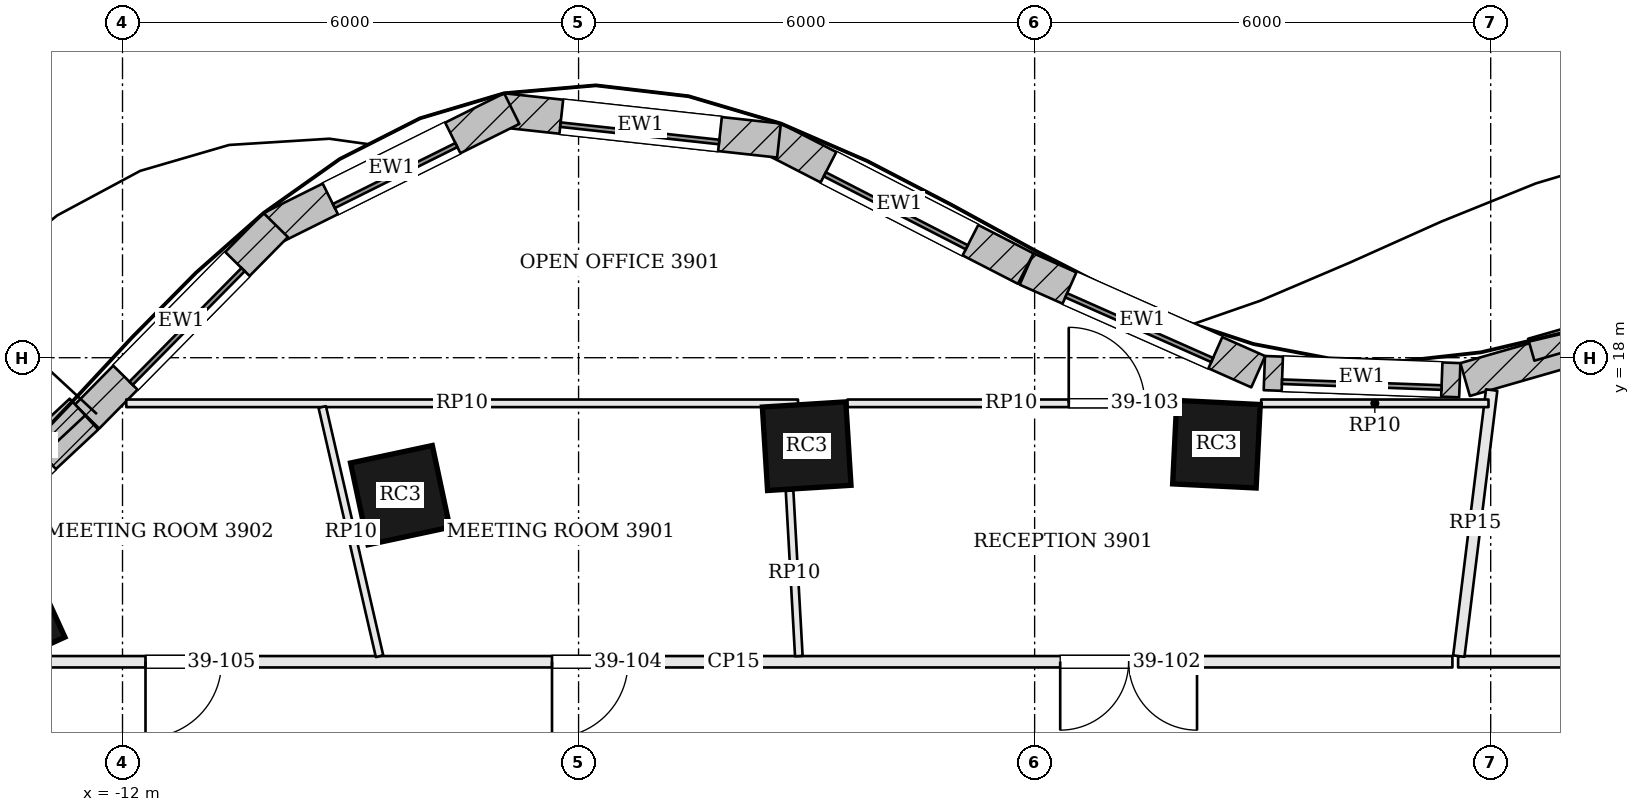
"""IFC4 building model, lengths in metres.
Left out: names, types, materials, properties, quantities, classifications, styles, units other than length and angle.
Written with IfcOpenShell. Run it as: python <this file> out.ifc"""

import sys

from ifc_helpers import new_model, si_unit, direction, frame, frame_2d, origin, origin_2d, place, context, subcontext, project, spatial, rectangle, extrude, element, fill, save


model = new_model("IFC4")
c1 = context("Model", 3, precision=1e-05, world=origin(), true_north=direction((0.0, 1.0)))
c2 = subcontext(c1, "Body", "Model", "MODEL_VIEW")
j1 = project(units=[si_unit("LENGTHUNIT", "METRE"), si_unit("PLANEANGLEUNIT", "RADIAN")], contexts=[c1])
p1 = place(None, origin())
s1 = spatial("IfcSite", under=j1, at=p1, CompositionType="ELEMENT")
p2 = place(p1, origin())
s2 = spatial("IfcBuilding", under=s1, at=p2, CompositionType="ELEMENT")
p3 = place(p2, frame((0.0, 0.0, 161.7)))
s3 = spatial("IfcBuildingStorey", under=s2, at=p3, CompositionType="ELEMENT", Elevation=161.7)
for number, where, z_axis, x_axis in (
    (1, (2.392, 16.862, 0.0), (0.0, 0.0, 1.0), (-0.999, 0.049, 0.0)),
    (2, (-2.999, 16.836, 0.0), (0.0, 0.0, 1.0), (-0.998, -0.062, 0.0)),
    (3, (-8.347, 16.192, 0.0), (0.0, 0.0, 1.0), (-0.978, -0.209, 0.0)),
    (4, (-13.487, 14.596, 0.0), (0.0, 0.0, 1.0), (-0.91, -0.415, 0.0)),
):
    element("IfcColumn", number, at=place(p3, frame(where, z_axis=z_axis, x_axis=x_axis)), inside=s3, PredefinedType="COLUMN", context=c2, shape_type="SweptSolid", body=[
        extrude(rectangle(XDim=1.1, YDim=1.1, at=origin_2d()), origin(), (0.0, 0.0, 1.0), 3.9),
    ])
p4 = place(p3, frame((10.167, 19.007, 0.0), z_axis=(0.0, 0.0, 1.0), x_axis=(-0.961104057783, -0.276186513271, 0.0)))
e5 = element("IfcWall", 5, at=p4, inside=s3, PredefinedType="SOLIDWALL", context=c2, shape_type="SweptSolid", body=[
    extrude(rectangle(XDim=4.686, YDim=0.45, at=frame_2d((2.343, 0.0))), origin(), (0.0, 0.0, 1.0), 3.7),
])
p5 = place(p4, frame((1.443, 0.0, 0.9)))
e6 = element("IfcOpeningElement", 6, at=p5, cuts=e5, PredefinedType="OPENING", context=c2, shape_type="SweptSolid", body=[
    extrude(rectangle(XDim=1.8, YDim=2.3, at=frame_2d((0.9, 1.15))), frame((0.0, 0.235, 0.0), z_axis=(0.0, -1.0, 0.0), x_axis=(1.0, 0.0, 0.0)), (0.0, 0.0, 1.0), 0.47),
])
p6 = place(p3, frame((5.594, 17.704, 0.0), z_axis=(0.0, 0.0, 1.0), x_axis=(-0.999339560591, 0.036337895349, 0.0)))
e7 = element("IfcWall", 7, at=p6, inside=s3, PredefinedType="SOLIDWALL", context=c2, shape_type="SweptSolid", body=[
    extrude(rectangle(XDim=2.573, YDim=0.45, at=frame_2d((1.287, 0.0))), origin(), (0.0, 0.0, 1.0), 3.7),
])
p7 = place(p6, frame((0.237, 0.0, 0.9)))
e8 = element("IfcOpeningElement", 8, at=p7, cuts=e7, PredefinedType="OPENING", context=c2, shape_type="SweptSolid", body=[
    extrude(rectangle(XDim=2.1, YDim=2.3, at=frame_2d((1.05, 1.15))), frame((0.0, 0.235, 0.0), z_axis=(0.0, -1.0, 0.0), x_axis=(1.0, 0.0, 0.0)), (0.0, 0.0, 1.0), 0.47),
])
p8 = place(p3, frame((2.942, 17.816, 0.0), z_axis=(0.0, 0.0, 1.0), x_axis=(-0.91414046241, 0.405397601109, 0.0)))
e9 = element("IfcWall", 9, at=p8, inside=s3, PredefinedType="SOLIDWALL", context=c2, shape_type="SweptSolid", body=[
    extrude(rectangle(XDim=3.333, YDim=0.45, at=frame_2d((1.667, 0.0))), origin(), (0.0, 0.0, 1.0), 3.7),
])
p9 = place(p8, frame((0.617, 0.0, 0.9)))
e10 = element("IfcOpeningElement", 10, at=p9, cuts=e9, PredefinedType="OPENING", context=c2, shape_type="SweptSolid", body=[
    extrude(rectangle(XDim=2.1, YDim=2.3, at=frame_2d((1.05, 1.15))), frame((0.0, 0.235, 0.0), z_axis=(0.0, -1.0, 0.0), x_axis=(1.0, 0.0, 0.0)), (0.0, 0.0, 1.0), 0.47),
])
p10 = place(p3, frame((-0.117, 19.173, 0.0), z_axis=(0.0, 0.0, 1.0), x_axis=(-0.889471529144, 0.456990589446, 0.0)))
e11 = element("IfcWall", 11, at=p10, inside=s3, PredefinedType="SOLIDWALL", context=c2, shape_type="SweptSolid", body=[
    extrude(rectangle(XDim=3.735, YDim=0.45, at=frame_2d((1.868, 0.0))), origin(), (0.0, 0.0, 1.0), 3.7),
])
p11 = place(p10, frame((0.818, 0.0, 0.9)))
e12 = element("IfcOpeningElement", 12, at=p11, cuts=e11, PredefinedType="OPENING", context=c2, shape_type="SweptSolid", body=[
    extrude(rectangle(XDim=2.1, YDim=2.3, at=frame_2d((1.05, 1.15))), frame((0.0, 0.235, 0.0), z_axis=(0.0, -1.0, 0.0), x_axis=(1.0, 0.0, 0.0)), (0.0, 0.0, 1.0), 0.47),
])
p12 = place(p3, frame((-3.364, 20.857, 0.0), z_axis=(0.0, 0.0, 1.0), x_axis=(-0.99407653264, 0.108682322638, 0.0)))
e13 = element("IfcWall", 13, at=p12, inside=s3, PredefinedType="SOLIDWALL", context=c2, shape_type="SweptSolid", body=[
    extrude(rectangle(XDim=3.662, YDim=0.45, at=frame_2d((1.831, 0.0))), origin(), (0.0, 0.0, 1.0), 3.7),
])
p13 = place(p12, frame((0.781, 0.0, 0.9)))
e14 = element("IfcOpeningElement", 14, at=p13, cuts=e13, PredefinedType="OPENING", context=c2, shape_type="SweptSolid", body=[
    extrude(rectangle(XDim=2.1, YDim=2.3, at=frame_2d((1.05, 1.15))), frame((0.0, 0.235, 0.0), z_axis=(0.0, -1.0, 0.0), x_axis=(1.0, 0.0, 0.0)), (0.0, 0.0, 1.0), 0.47),
])
p14 = place(p3, frame((-6.879, 21.278, 0.0), z_axis=(0.0, 0.0, 1.0), x_axis=(-0.895268695224, -0.445526613517, 0.0)))
e15 = element("IfcWall", 15, at=p14, inside=s3, PredefinedType="SOLIDWALL", context=c2, shape_type="SweptSolid", body=[
    extrude(rectangle(XDim=3.533, YDim=0.45, at=frame_2d((1.767, 0.0))), origin(), (0.0, 0.0, 1.0), 3.7),
])
p15 = place(p14, frame((0.866, 0.0, 0.9)))
e16 = element("IfcOpeningElement", 16, at=p15, cuts=e15, PredefinedType="OPENING", context=c2, shape_type="SweptSolid", body=[
    extrude(rectangle(XDim=1.8, YDim=2.3, at=frame_2d((0.9, 1.15))), frame((0.0, 0.235, 0.0), z_axis=(0.0, -1.0, 0.0), x_axis=(1.0, 0.0, 0.0)), (0.0, 0.0, 1.0), 0.47),
])
p16 = place(p3, frame((-9.984, 19.745, 0.0), z_axis=(0.0, 0.0, 1.0), x_axis=(-0.701875966769, -0.712299183821, 0.0)))
e17 = element("IfcWall", 17, at=p16, inside=s3, PredefinedType="SOLIDWALL", context=c2, shape_type="SweptSolid", body=[
    extrude(rectangle(XDim=3.537, YDim=0.45, at=frame_2d((1.769, 0.0))), origin(), (0.0, 0.0, 1.0), 3.7),
])
p17 = place(p16, frame((0.718, 0.0, 0.9)))
e18 = element("IfcOpeningElement", 18, at=p17, cuts=e17, PredefinedType="OPENING", context=c2, shape_type="SweptSolid", body=[
    extrude(rectangle(XDim=2.1, YDim=2.3, at=frame_2d((1.05, 1.15))), frame((0.0, 0.235, 0.0), z_axis=(0.0, -1.0, 0.0), x_axis=(1.0, 0.0, 0.0)), (0.0, 0.0, 1.0), 0.47),
])
p18 = place(p3, frame((-12.473, 17.219, 0.0), z_axis=(0.0, 0.0, 1.0), x_axis=(-0.730618259172, -0.68278617397, 0.0)))
e19 = element("IfcWall", 19, at=p18, inside=s3, PredefinedType="SOLIDWALL", context=c2, shape_type="SweptSolid", body=[
    extrude(rectangle(XDim=3.624, YDim=0.45, at=frame_2d((1.812, 0.0))), origin(), (0.0, 0.0, 1.0), 3.7),
])
p19 = place(p18, frame((0.762, 0.0, 0.9)))
e20 = element("IfcOpeningElement", 20, at=p19, cuts=e19, PredefinedType="OPENING", context=c2, shape_type="SweptSolid", body=[
    extrude(rectangle(XDim=2.1, YDim=2.3, at=frame_2d((1.05, 1.15))), frame((0.0, 0.235, 0.0), z_axis=(0.0, -1.0, 0.0), x_axis=(1.0, 0.0, 0.0)), (0.0, 0.0, 1.0), 0.47),
])
p20 = place(p3, frame((9.765, 19.034, 3.9), z_axis=(0.0, 0.0, 1.0), x_axis=(-0.961095330658, -0.276216881069, 0.0)))
e21 = element("IfcWall", 21, at=p20, inside=s3, PredefinedType="PARAPET", context=c2, shape_type="SweptSolid", body=[
    extrude(rectangle(XDim=3.362, YDim=0.3, at=frame_2d((1.681, 0.0))), origin(), (0.0, 0.0, 1.0), 1.1),
])
p21 = place(p3, frame((-12.593, 17.351, 3.9), z_axis=(0.0, 0.0, 1.0), x_axis=(-0.730582493513, -0.682824443157, 0.0)))
e22 = element("IfcWall", 22, at=p21, inside=s3, PredefinedType="PARAPET", context=c2, shape_type="SweptSolid", body=[
    extrude(rectangle(XDim=1.477, YDim=0.3, at=frame_2d((0.739, 0.0))), origin(), (0.0, 0.0, 1.0), 1.1),
])
p22 = place(p3, frame((14.925, 14.0, 0.0), z_axis=(0.0, 0.0, 1.0), x_axis=(-1.0, 0.0, 0.0)))
e23 = element("IfcWall", 23, at=p22, inside=s3, PredefinedType="PARTITIONING", context=c2, shape_type="SweptSolid", body=[
    extrude(rectangle(XDim=9.354, YDim=0.15, at=frame_2d((4.677, 0.0))), origin(), (0.0, 0.0, 1.0), 3.198),
])
p23 = place(p3, frame((6.013, 17.575, 0.0), z_axis=(0.0, 0.0, 1.0), x_axis=(-0.122526572003, -0.992465233221, 0.0)))
e24 = element("IfcWall", 24, at=p23, inside=s3, PredefinedType="PARTITIONING", context=c2, shape_type="SweptSolid", body=[
    extrude(rectangle(XDim=3.527, YDim=0.15, at=frame_2d((1.763, 0.0))), origin(), (0.0, 0.0, 1.0), 3.234),
])
p24 = place(p3, frame((5.497, 14.0, 0.0), z_axis=(0.0, 0.0, 1.0), x_axis=(-1.0, 0.0, 0.0)))
e25 = element("IfcWall", 25, at=p24, inside=s3, PredefinedType="PARTITIONING", context=c2, shape_type="SweptSolid", body=[
    extrude(rectangle(XDim=18.917, YDim=0.15, at=frame_2d((9.458, 0.0))), origin(), (0.0, 0.0, 1.0), 3.198),
])
p25 = place(p24, frame((3.36, 0.0, 0.0)))
e26 = element("IfcOpeningElement", 26, at=p25, cuts=e25, PredefinedType="OPENING", context=c2, shape_type="SweptSolid", body=[
    extrude(rectangle(XDim=1.8, YDim=2.1, at=frame_2d((0.9, 1.05))), frame((0.0, 0.085, 0.0), z_axis=(0.0, -1.0, 0.0), x_axis=(1.0, 0.0, 0.0)), (0.0, 0.0, 1.0), 0.17),
])
p26 = place(p24, frame((10.846, 0.0, 0.0)))
e27 = element("IfcOpeningElement", 27, at=p26, cuts=e25, PredefinedType="OPENING", context=c2, shape_type="SweptSolid", body=[
    extrude(rectangle(XDim=1.0, YDim=2.4, at=frame_2d((0.5, 1.2))), frame((0.0, 0.085, 0.0), z_axis=(0.0, -1.0, 0.0), x_axis=(1.0, 0.0, 0.0)), (0.0, 0.0, 1.0), 0.17),
])
p27 = place(p24, frame((16.194, 0.0, 0.0)))
e28 = element("IfcOpeningElement", 28, at=p27, cuts=e25, PredefinedType="OPENING", context=c2, shape_type="SweptSolid", body=[
    extrude(rectangle(XDim=1.0, YDim=2.4, at=frame_2d((0.5, 1.2))), frame((0.0, 0.085, 0.0), z_axis=(0.0, -1.0, 0.0), x_axis=(1.0, 0.0, 0.0)), (0.0, 0.0, 1.0), 0.17),
])
p28 = place(p3, frame((-11.951, 17.4, 0.0), z_axis=(0.0, 0.0, 1.0), x_axis=(1.0, 0.0, 0.0)))
e29 = element("IfcWall", 29, at=p28, inside=s3, PredefinedType="PARTITIONING", context=c2, shape_type="SweptSolid", body=[
    extrude(rectangle(XDim=8.838, YDim=0.1, at=frame_2d((4.419, 0.0))), origin(), (0.0, 0.0, 1.0), 3.198),
])
p29 = place(p3, frame((-2.463, 17.4, 0.0), z_axis=(0.0, 0.0, 1.0), x_axis=(1.0, 0.0, 0.0)))
e30 = element("IfcWall", 30, at=p29, inside=s3, PredefinedType="PARTITIONING", context=c2, shape_type="SweptSolid", body=[
    extrude(rectangle(XDim=4.311, YDim=0.1, at=frame_2d((2.156, 0.0))), origin(), (0.0, 0.0, 1.0), 3.198),
])
p30 = place(p29, frame((2.912, 0.0, 0.0)))
e31 = element("IfcOpeningElement", 31, at=p30, cuts=e30, PredefinedType="OPENING", context=c2, shape_type="SweptSolid", body=[
    extrude(rectangle(XDim=1.0, YDim=2.1, at=frame_2d((0.5, 1.05))), frame((0.0, 0.06, 0.0), z_axis=(0.0, -1.0, 0.0), x_axis=(1.0, 0.0, 0.0)), (0.0, 0.0, 1.0), 0.12),
])
p31 = place(p3, frame((2.981, 17.4, 0.0), z_axis=(0.0, 0.0, 1.0), x_axis=(1.0, 0.0, 0.0)))
e32 = element("IfcWall", 32, at=p31, inside=s3, PredefinedType="PARTITIONING", context=c2, shape_type="SweptSolid", body=[
    extrude(rectangle(XDim=2.99, YDim=0.1, at=frame_2d((1.495, 0.0))), origin(), (0.0, 0.0, 1.0), 3.198),
])
p32 = place(p3, frame((-3.102, 14.075, 0.0), z_axis=(0.0, 0.0, 1.0), x_axis=(-0.055904356841, 0.998436128596, 0.0)))
e33 = element("IfcWall", 33, at=p32, inside=s3, PredefinedType="PARTITIONING", context=c2, shape_type="SweptSolid", body=[
    extrude(rectangle(XDim=2.179, YDim=0.1, at=frame_2d((1.09, 0.0))), origin(), (0.0, 0.0, 1.0), 3.198),
])
p33 = place(p3, frame((-8.618, 14.073, 0.0), z_axis=(0.0, 0.0, 1.0), x_axis=(-0.224048430302, 0.974578011695, 0.0)))
e34 = element("IfcWall", 34, at=p33, inside=s3, PredefinedType="PARTITIONING", context=c2, shape_type="SweptSolid", body=[
    extrude(rectangle(XDim=3.364, YDim=0.1, at=frame_2d((1.682, 0.0))), origin(), (0.0, 0.0, 1.0), 3.198),
])
p34 = place(p7, origin())
e35 = element("IfcWindow", 35, at=p34, inside=s3, PartitioningType="SINGLE_PANEL", PredefinedType="WINDOW", context=c2, shape_type="SweptSolid", body=[
    extrude(rectangle(XDim=2.1, YDim=2.3, at=frame_2d((1.05, 1.15))), frame((0.0, 0.135, 0.0), z_axis=(0.0, -1.0, 0.0), x_axis=(1.0, 0.0, 0.0)), (0.0, 0.0, 1.0), 0.06),
])
fill(e8, e35)
p35 = place(p9, origin())
e36 = element("IfcWindow", 36, at=p35, inside=s3, PartitioningType="SINGLE_PANEL", PredefinedType="WINDOW", context=c2, shape_type="SweptSolid", body=[
    extrude(rectangle(XDim=2.1, YDim=2.3, at=frame_2d((1.05, 1.15))), frame((0.0, 0.135, 0.0), z_axis=(0.0, -1.0, 0.0), x_axis=(1.0, 0.0, 0.0)), (0.0, 0.0, 1.0), 0.06),
])
fill(e10, e36)
p36 = place(p11, origin())
e37 = element("IfcWindow", 37, at=p36, inside=s3, PartitioningType="SINGLE_PANEL", PredefinedType="WINDOW", context=c2, shape_type="SweptSolid", body=[
    extrude(rectangle(XDim=2.1, YDim=2.3, at=frame_2d((1.05, 1.15))), frame((0.0, 0.135, 0.0), z_axis=(0.0, -1.0, 0.0), x_axis=(1.0, 0.0, 0.0)), (0.0, 0.0, 1.0), 0.06),
])
fill(e12, e37)
p37 = place(p13, origin())
e38 = element("IfcWindow", 38, at=p37, inside=s3, PartitioningType="SINGLE_PANEL", PredefinedType="WINDOW", context=c2, shape_type="SweptSolid", body=[
    extrude(rectangle(XDim=2.1, YDim=2.3, at=frame_2d((1.05, 1.15))), frame((0.0, 0.135, 0.0), z_axis=(0.0, -1.0, 0.0), x_axis=(1.0, 0.0, 0.0)), (0.0, 0.0, 1.0), 0.06),
])
fill(e14, e38)
p38 = place(p15, origin())
e39 = element("IfcWindow", 39, at=p38, inside=s3, PartitioningType="SINGLE_PANEL", PredefinedType="WINDOW", context=c2, shape_type="SweptSolid", body=[
    extrude(rectangle(XDim=1.8, YDim=2.3, at=frame_2d((0.9, 1.15))), frame((0.0, 0.135, 0.0), z_axis=(0.0, -1.0, 0.0), x_axis=(1.0, 0.0, 0.0)), (0.0, 0.0, 1.0), 0.06),
])
fill(e16, e39)
p39 = place(p17, origin())
e40 = element("IfcWindow", 40, at=p39, inside=s3, PartitioningType="SINGLE_PANEL", PredefinedType="WINDOW", context=c2, shape_type="SweptSolid", body=[
    extrude(rectangle(XDim=2.1, YDim=2.3, at=frame_2d((1.05, 1.15))), frame((0.0, 0.135, 0.0), z_axis=(0.0, -1.0, 0.0), x_axis=(1.0, 0.0, 0.0)), (0.0, 0.0, 1.0), 0.06),
])
fill(e18, e40)
p40 = place(p25, origin())
e41 = element("IfcDoor", 41, at=p40, inside=s3, OperationType="DOUBLE_DOOR_SINGLE_SWING", PredefinedType="DOOR", context=c2, shape_type="SweptSolid", body=[
    extrude(rectangle(XDim=1.8, YDim=2.1, at=frame_2d((0.9, 1.05))), frame((0.0, 0.025, 0.0), z_axis=(0.0, -1.0, 0.0), x_axis=(1.0, 0.0, 0.0)), (0.0, 0.0, 1.0), 0.05),
])
fill(e26, e41)
p41 = place(p30, origin())
e42 = element("IfcDoor", 42, at=p41, inside=s3, OperationType="SINGLE_SWING_LEFT", PredefinedType="DOOR", context=c2, shape_type="SweptSolid", body=[
    extrude(rectangle(XDim=1.0, YDim=2.1, at=frame_2d((0.5, 1.05))), frame((0.0, 0.025, 0.0), z_axis=(0.0, -1.0, 0.0), x_axis=(1.0, 0.0, 0.0)), (0.0, 0.0, 1.0), 0.05),
])
fill(e31, e42)
p42 = place(p26, origin())
e43 = element("IfcDoor", 43, at=p42, inside=s3, OperationType="SINGLE_SWING_RIGHT", PredefinedType="DOOR", context=c2, shape_type="SweptSolid", body=[
    extrude(rectangle(XDim=1.0, YDim=2.4, at=frame_2d((0.5, 1.2))), frame((0.0, 0.025, 0.0), z_axis=(0.0, -1.0, 0.0), x_axis=(1.0, 0.0, 0.0)), (0.0, 0.0, 1.0), 0.05),
])
fill(e27, e43)
p43 = place(p27, origin())
e44 = element("IfcDoor", 44, at=p43, inside=s3, OperationType="SINGLE_SWING_RIGHT", PredefinedType="DOOR", context=c2, shape_type="SweptSolid", body=[
    extrude(rectangle(XDim=1.0, YDim=2.4, at=frame_2d((0.5, 1.2))), frame((0.0, 0.025, 0.0), z_axis=(0.0, -1.0, 0.0), x_axis=(1.0, 0.0, 0.0)), (0.0, 0.0, 1.0), 0.05),
])
fill(e28, e44)
save(model, sys.argv[1])
